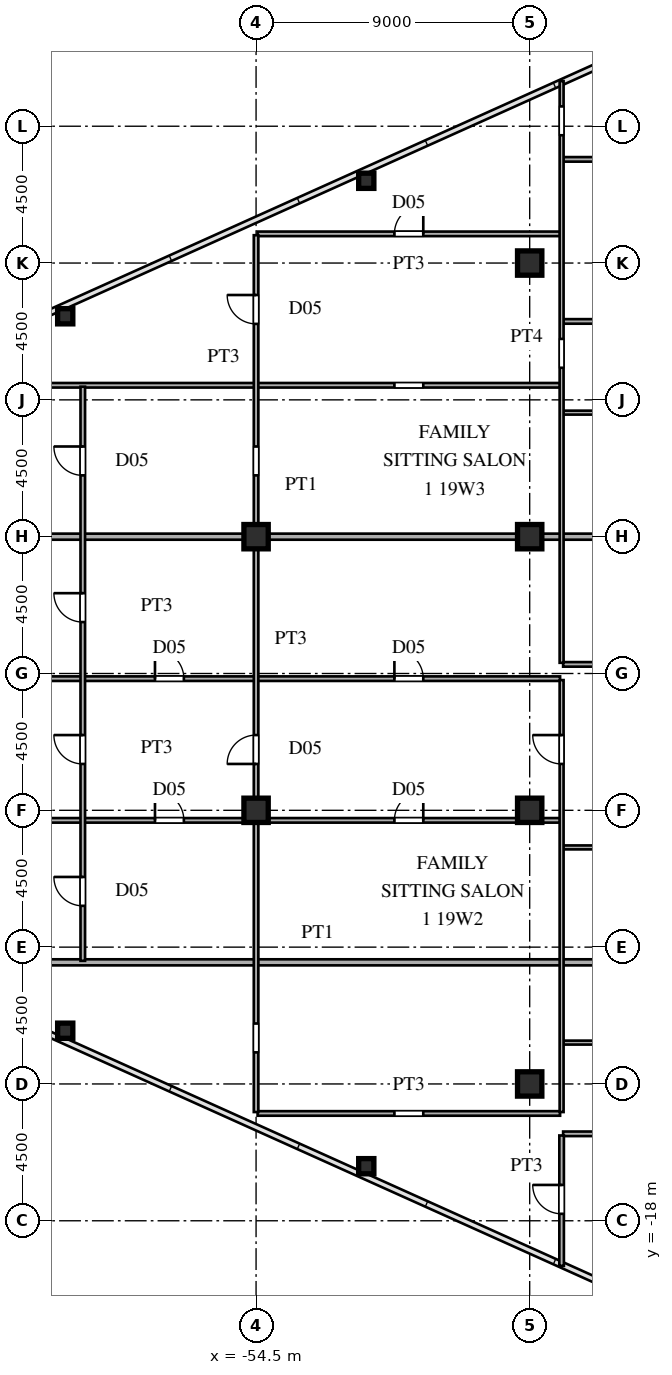
"""IFC4 building model, lengths in metres.
Left out: names, types, materials, properties, quantities, classifications, styles, units other than length and angle.
Written with IfcOpenShell. Run it as: python <this file> out.ifc"""

import sys

from ifc_helpers import new_model, si_unit, direction, frame, frame_2d, origin, origin_2d, place, context, subcontext, project, spatial, rectangle, hollow_rectangle, i_section, extrude, source, transform, mapped, element, fill, save


model = new_model("IFC4")
c1 = context("Model", 3, precision=1e-05, world=origin(), true_north=direction((0.0, 1.0)))
c2 = subcontext(c1, "Body", "Model", "MODEL_VIEW")
j1 = project(units=[si_unit("LENGTHUNIT", "METRE"), si_unit("PLANEANGLEUNIT", "RADIAN")], contexts=[c1])
p1 = place(None, origin())
s1 = spatial("IfcSite", under=j1, at=p1, CompositionType="ELEMENT")
p2 = place(p1, origin())
s2 = spatial("IfcBuilding", under=s1, at=p2, CompositionType="ELEMENT")
p3 = place(p2, frame((0.0, 0.0, 72.9)))
s3 = spatial("IfcBuildingStorey", under=s2, at=p3, CompositionType="ELEMENT", Elevation=72.9)
m1 = source(origin(), c2, "Body", "SweptSolid", [
    extrude(i_section(OverallWidth=0.8, OverallDepth=0.8, WebThickness=0.032, FlangeThickness=0.05, at=origin_2d()), origin(), (0.0, 0.0, 1.0), 3.6),
])
for number, where, z_axis, x_axis in (
    (1, (-45.5, -13.5, 0.0), (0.0, 0.0, 1.0), (1.0, 0.0, 0.0)),
    (2, (-45.5, -4.5, 0.0), (0.0, 0.0, 1.0), (1.0, 0.0, 0.0)),
    (3, (-45.5, 4.5, 0.0), (0.0, 0.0, 1.0), (1.0, 0.0, 0.0)),
    (4, (-45.5, 13.5, 0.0), (0.0, 0.0, 1.0), (1.0, 0.0, 0.0)),
    (5, (-54.5, -4.5, 0.0), (0.0, 0.0, 1.0), (1.0, 0.0, 0.0)),
    (6, (-54.5, 4.5, 0.0), (0.0, 0.0, 1.0), (1.0, 0.0, 0.0)),
):
    element("IfcColumn", number, at=place(p3, frame(where, z_axis=z_axis, x_axis=x_axis)), inside=s3, PredefinedType="COLUMN", context=c2, shape_type="MappedRepresentation", body=[
        mapped(m1, transform((0.0, 0.0, 0.0), scale=1.0)),
    ])
m2 = source(origin(), c2, "Body", "SweptSolid", [
    extrude(hollow_rectangle(XDim=0.5, YDim=0.5, WallThickness=0.02, at=origin_2d()), origin(), (0.0, 0.0, 1.0), 3.6),
])
for number, where, z_axis, x_axis in (
    (7, (-50.875, -16.205, 0.0), (0.0, 0.0, 1.0), (1.0, 0.0, 0.0)),
    (8, (-60.778, -11.749, 0.0), (0.0, 0.0, 1.0), (1.0, 0.0, 0.0)),
    (9, (-50.875, 16.205, 0.0), (0.0, 0.0, 1.0), (1.0, 0.0, 0.0)),
    (10, (-60.778, 11.749, 0.0), (0.0, 0.0, 1.0), (1.0, 0.0, 0.0)),
):
    element("IfcColumn", number, at=place(p3, frame(where, z_axis=z_axis, x_axis=x_axis)), inside=s3, PredefinedType="COLUMN", context=c2, shape_type="MappedRepresentation", body=[
        mapped(m2, transform((0.0, 0.0, 0.0), scale=1.0)),
    ])
p4 = place(p3, frame((-44.4, -15.14, 0.0), z_axis=(0.0, 0.0, 1.0), x_axis=(1.0, 0.0, 0.0)))
e11 = element("IfcWall", 11, at=p4, inside=s3, PredefinedType="PARTITIONING", context=c2, shape_type="SweptSolid", body=[
    extrude(rectangle(XDim=6.05, YDim=0.15, at=frame_2d((3.025, 0.0))), origin(), (0.0, 0.0, 1.0), 3.38),
])
p5 = place(p4, frame((2.55, 0.0, 0.0)))
e12 = element("IfcOpeningElement", 12, at=p5, cuts=e11, PredefinedType="OPENING", context=c2, shape_type="SweptSolid", body=[
    extrude(rectangle(XDim=0.95, YDim=2.15, at=frame_2d((0.475, 1.075))), frame((0.0, 0.085, 0.0), z_axis=(0.0, -1.0, 0.0), x_axis=(1.0, 0.0, 0.0)), (0.0, 0.0, 1.0), 0.17),
])
p6 = place(p3, frame((-54.45, -14.47, 0.0), z_axis=(0.0, 0.0, 1.0), x_axis=(1.0, 0.0, 0.0)))
e13 = element("IfcWall", 13, at=p6, inside=s3, PredefinedType="PARTITIONING", context=c2, shape_type="SweptSolid", body=[
    extrude(rectangle(XDim=9.95, YDim=0.15, at=frame_2d((4.975, 0.0))), origin(), (0.0, 0.0, 1.0), 3.38),
])
p7 = place(p6, frame((4.5, 0.0, 0.0)))
e14 = element("IfcOpeningElement", 14, at=p7, cuts=e13, PredefinedType="OPENING", context=c2, shape_type="SweptSolid", body=[
    extrude(rectangle(XDim=0.95, YDim=2.15, at=frame_2d((0.475, 1.075))), frame((0.0, 0.085, 0.0), z_axis=(0.0, -1.0, 0.0), x_axis=(1.0, 0.0, 0.0)), (0.0, 0.0, 1.0), 0.17),
])
p8 = place(p3, frame((-44.4, -12.14, 0.0), z_axis=(0.0, 0.0, 1.0), x_axis=(1.0, 0.0, 0.0)))
e15 = element("IfcWall", 15, at=p8, inside=s3, PredefinedType="PARTITIONING", context=c2, shape_type="SweptSolid", body=[
    extrude(rectangle(XDim=6.05, YDim=0.13, at=frame_2d((3.025, 0.0))), origin(), (0.0, 0.0, 1.0), 3.38),
])
p9 = place(p8, frame((2.585, 0.0, 0.0)))
e16 = element("IfcOpeningElement", 16, at=p9, cuts=e15, PredefinedType="OPENING", context=c2, shape_type="SweptSolid", body=[
    extrude(rectangle(XDim=0.88, YDim=2.1, at=frame_2d((0.44, 1.05))), frame((0.0, 0.075, 0.0), z_axis=(0.0, -1.0, 0.0), x_axis=(1.0, 0.0, 0.0)), (0.0, 0.0, 1.0), 0.15),
])
p10 = place(p3, frame((-66.568, -9.5, 0.0), z_axis=(0.0, 0.0, 1.0), x_axis=(1.0, 0.0, 0.0)))
e17 = element("IfcWall", 17, at=p10, inside=s3, PredefinedType="PARTITIONING", context=c2, shape_type="SweptSolid", body=[
    extrude(rectangle(XDim=28.188, YDim=0.2, at=frame_2d((14.094, 0.0))), origin(), (0.0, 0.0, 1.0), 3.38),
])
p11 = place(p3, frame((-44.4, -5.72, 0.0), z_axis=(0.0, 0.0, 1.0), x_axis=(1.0, 0.0, 0.0)))
e18 = element("IfcWall", 18, at=p11, inside=s3, PredefinedType="PARTITIONING", context=c2, shape_type="SweptSolid", body=[
    extrude(rectangle(XDim=6.05, YDim=0.13, at=frame_2d((3.025, 0.0))), origin(), (0.0, 0.0, 1.0), 3.38),
])
p12 = place(p11, frame((2.585, 0.0, 0.0)))
e19 = element("IfcOpeningElement", 19, at=p12, cuts=e18, PredefinedType="OPENING", context=c2, shape_type="SweptSolid", body=[
    extrude(rectangle(XDim=0.88, YDim=2.1, at=frame_2d((0.44, 1.05))), frame((0.0, 0.075, 0.0), z_axis=(0.0, -1.0, 0.0), x_axis=(1.0, 0.0, 0.0)), (0.0, 0.0, 1.0), 0.15),
])
p13 = place(p3, frame((-71.035, -4.83, 0.0), z_axis=(0.0, 0.0, 1.0), x_axis=(1.0, 0.0, 0.0)))
e20 = element("IfcWall", 20, at=p13, inside=s3, PredefinedType="PARTITIONING", context=c2, shape_type="SweptSolid", body=[
    extrude(rectangle(XDim=26.535, YDim=0.15, at=frame_2d((13.268, 0.0))), origin(), (0.0, 0.0, 1.0), 3.38),
])
p14 = place(p13, frame((21.085, 0.0, 0.0)))
e21 = element("IfcOpeningElement", 21, at=p14, cuts=e20, PredefinedType="OPENING", context=c2, shape_type="SweptSolid", body=[
    extrude(rectangle(XDim=0.95, YDim=2.15, at=frame_2d((0.475, 1.075))), frame((0.0, 0.085, 0.0), z_axis=(0.0, -1.0, 0.0), x_axis=(1.0, 0.0, 0.0)), (0.0, 0.0, 1.0), 0.17),
])
p15 = place(p13, frame((13.21, 0.0, 0.0)))
e22 = element("IfcOpeningElement", 22, at=p15, cuts=e20, PredefinedType="OPENING", context=c2, shape_type="SweptSolid", body=[
    extrude(rectangle(XDim=0.95, YDim=2.15, at=frame_2d((0.475, 1.075))), frame((0.0, 0.085, 0.0), z_axis=(0.0, -1.0, 0.0), x_axis=(1.0, 0.0, 0.0)), (0.0, 0.0, 1.0), 0.17),
])
p16 = place(p3, frame((-71.035, -0.17, 0.0), z_axis=(0.0, 0.0, 1.0), x_axis=(1.0, 0.0, 0.0)))
e23 = element("IfcWall", 23, at=p16, inside=s3, PredefinedType="PARTITIONING", context=c2, shape_type="SweptSolid", body=[
    extrude(rectangle(XDim=26.535, YDim=0.15, at=frame_2d((13.268, 0.0))), origin(), (0.0, 0.0, 1.0), 3.38),
])
p17 = place(p16, frame((21.085, 0.0, 0.0)))
e24 = element("IfcOpeningElement", 24, at=p17, cuts=e23, PredefinedType="OPENING", context=c2, shape_type="SweptSolid", body=[
    extrude(rectangle(XDim=0.95, YDim=2.15, at=frame_2d((0.475, 1.075))), frame((0.0, 0.085, 0.0), z_axis=(0.0, -1.0, 0.0), x_axis=(1.0, 0.0, 0.0)), (0.0, 0.0, 1.0), 0.17),
])
p18 = place(p16, frame((13.21, 0.0, 0.0)))
e25 = element("IfcOpeningElement", 25, at=p18, cuts=e23, PredefinedType="OPENING", context=c2, shape_type="SweptSolid", body=[
    extrude(rectangle(XDim=0.95, YDim=2.15, at=frame_2d((0.475, 1.075))), frame((0.0, 0.085, 0.0), z_axis=(0.0, -1.0, 0.0), x_axis=(1.0, 0.0, 0.0)), (0.0, 0.0, 1.0), 0.17),
])
p19 = place(p3, frame((-44.4, 0.3, 0.0), z_axis=(0.0, 0.0, 1.0), x_axis=(1.0, 0.0, 0.0)))
e26 = element("IfcWall", 26, at=p19, inside=s3, PredefinedType="PARTITIONING", context=c2, shape_type="SweptSolid", body=[
    extrude(rectangle(XDim=6.05, YDim=0.15, at=frame_2d((3.025, 0.0))), origin(), (0.0, 0.0, 1.0), 3.38),
])
p20 = place(p19, frame((2.55, 0.0, 0.0)))
e27 = element("IfcOpeningElement", 27, at=p20, cuts=e26, PredefinedType="OPENING", context=c2, shape_type="SweptSolid", body=[
    extrude(rectangle(XDim=0.95, YDim=2.15, at=frame_2d((0.475, 1.075))), frame((0.0, 0.085, 0.0), z_axis=(0.0, -1.0, 0.0), x_axis=(1.0, 0.0, 0.0)), (0.0, 0.0, 1.0), 0.17),
])
p21 = place(p3, frame((-71.005, 4.5, 0.0), z_axis=(0.0, 0.0, 1.0), x_axis=(1.0, 0.0, 0.0)))
e28 = element("IfcWall", 28, at=p21, inside=s3, PredefinedType="PARTITIONING", context=c2, shape_type="SweptSolid", body=[
    extrude(rectangle(XDim=16.485, YDim=0.2, at=frame_2d((8.242, 0.0))), origin(), (0.0, 0.0, 1.0), 3.38),
])
p22 = place(p3, frame((-54.52, 4.5, 0.0), z_axis=(0.0, 0.0, 1.0), x_axis=(1.0, 0.0, 0.0)))
e29 = element("IfcWall", 29, at=p22, inside=s3, PredefinedType="PARTITIONING", context=c2, shape_type="SweptSolid", body=[
    extrude(rectangle(XDim=16.14, YDim=0.2, at=frame_2d((8.07, 0.0))), origin(), (0.0, 0.0, 1.0), 2.68),
])
p23 = place(p3, frame((-44.4, 8.58, 0.0), z_axis=(0.0, 0.0, 1.0), x_axis=(1.0, 0.0, 0.0)))
e30 = element("IfcWall", 30, at=p23, inside=s3, PredefinedType="PARTITIONING", context=c2, shape_type="SweptSolid", body=[
    extrude(rectangle(XDim=6.05, YDim=0.13, at=frame_2d((3.025, 0.0))), origin(), (0.0, 0.0, 1.0), 3.38),
])
p24 = place(p23, frame((2.585, 0.0, 0.0)))
e31 = element("IfcOpeningElement", 31, at=p24, cuts=e30, PredefinedType="OPENING", context=c2, shape_type="SweptSolid", body=[
    extrude(rectangle(XDim=0.88, YDim=2.1, at=frame_2d((0.44, 1.05))), frame((0.0, 0.075, 0.0), z_axis=(0.0, -1.0, 0.0), x_axis=(1.0, 0.0, 0.0)), (0.0, 0.0, 1.0), 0.15),
])
p25 = place(p3, frame((-66.629, 9.48, 0.0), z_axis=(0.0, 0.0, 1.0), x_axis=(1.0, 0.0, 0.0)))
e32 = element("IfcWall", 32, at=p25, inside=s3, PredefinedType="PARTITIONING", context=c2, shape_type="SweptSolid", body=[
    extrude(rectangle(XDim=22.129, YDim=0.15, at=frame_2d((11.064, 0.0))), origin(), (0.0, 0.0, 1.0), 3.38),
])
p26 = place(p25, frame((16.679, 0.0, 0.0)))
e33 = element("IfcOpeningElement", 33, at=p26, cuts=e32, PredefinedType="OPENING", context=c2, shape_type="SweptSolid", body=[
    extrude(rectangle(XDim=0.95, YDim=2.15, at=frame_2d((0.475, 1.075))), frame((0.0, 0.085, 0.0), z_axis=(0.0, -1.0, 0.0), x_axis=(1.0, 0.0, 0.0)), (0.0, 0.0, 1.0), 0.17),
])
p27 = place(p3, frame((-44.4, 11.58, 0.0), z_axis=(0.0, 0.0, 1.0), x_axis=(1.0, 0.0, 0.0)))
e34 = element("IfcWall", 34, at=p27, inside=s3, PredefinedType="PARTITIONING", context=c2, shape_type="SweptSolid", body=[
    extrude(rectangle(XDim=6.05, YDim=0.15, at=frame_2d((3.025, 0.0))), origin(), (0.0, 0.0, 1.0), 3.38),
])
p28 = place(p27, frame((2.55, 0.0, 0.0)))
e35 = element("IfcOpeningElement", 35, at=p28, cuts=e34, PredefinedType="OPENING", context=c2, shape_type="SweptSolid", body=[
    extrude(rectangle(XDim=0.95, YDim=2.15, at=frame_2d((0.475, 1.075))), frame((0.0, 0.085, 0.0), z_axis=(0.0, -1.0, 0.0), x_axis=(1.0, 0.0, 0.0)), (0.0, 0.0, 1.0), 0.17),
])
p29 = place(p3, frame((-54.45, 14.46, 0.0), z_axis=(0.0, 0.0, 1.0), x_axis=(1.0, 0.0, 0.0)))
e36 = element("IfcWall", 36, at=p29, inside=s3, PredefinedType="PARTITIONING", context=c2, shape_type="SweptSolid", body=[
    extrude(rectangle(XDim=9.95, YDim=0.15, at=frame_2d((4.975, 0.0))), origin(), (0.0, 0.0, 1.0), 3.38),
])
p30 = place(p29, frame((4.5, 0.0, 0.0)))
e37 = element("IfcOpeningElement", 37, at=p30, cuts=e36, PredefinedType="OPENING", context=c2, shape_type="SweptSolid", body=[
    extrude(rectangle(XDim=0.95, YDim=2.15, at=frame_2d((0.475, 1.075))), frame((0.0, 0.085, 0.0), z_axis=(0.0, -1.0, 0.0), x_axis=(1.0, 0.0, 0.0)), (0.0, 0.0, 1.0), 0.17),
])
p31 = place(p3, frame((-44.4, 16.91, 0.0), z_axis=(0.0, 0.0, 1.0), x_axis=(1.0, 0.0, 0.0)))
e38 = element("IfcWall", 38, at=p31, inside=s3, PredefinedType="PARTITIONING", context=c2, shape_type="SweptSolid", body=[
    extrude(rectangle(XDim=6.1, YDim=0.15, at=frame_2d((3.05, 0.0))), origin(), (0.0, 0.0, 1.0), 3.38),
])
p32 = place(p3, frame((-60.2, -9.45, 0.0), z_axis=(0.0, 0.0, 1.0), x_axis=(0.0, 1.0, 0.0)))
e39 = element("IfcWall", 39, at=p32, inside=s3, PredefinedType="PARTITIONING", context=c2, shape_type="SweptSolid", body=[
    extrude(rectangle(XDim=18.883, YDim=0.15, at=frame_2d((9.441, 0.0))), origin(), (0.0, 0.0, 1.0), 3.38),
])
p33 = place(p32, frame((1.808, 0.0, 0.0)))
e40 = element("IfcOpeningElement", 40, at=p33, cuts=e39, PredefinedType="OPENING", context=c2, shape_type="SweptSolid", body=[
    extrude(rectangle(XDim=0.95, YDim=2.15, at=frame_2d((0.475, 1.075))), frame((0.0, 0.085, 0.0), z_axis=(0.0, -1.0, 0.0), x_axis=(1.0, 0.0, 0.0)), (0.0, 0.0, 1.0), 0.17),
])
p34 = place(p32, frame((6.475, 0.0, 0.0)))
e41 = element("IfcOpeningElement", 41, at=p34, cuts=e39, PredefinedType="OPENING", context=c2, shape_type="SweptSolid", body=[
    extrude(rectangle(XDim=0.95, YDim=2.15, at=frame_2d((0.475, 1.075))), frame((0.0, 0.085, 0.0), z_axis=(0.0, -1.0, 0.0), x_axis=(1.0, 0.0, 0.0)), (0.0, 0.0, 1.0), 0.17),
])
p35 = place(p32, frame((11.142, 0.0, 0.0)))
e42 = element("IfcOpeningElement", 42, at=p35, cuts=e39, PredefinedType="OPENING", context=c2, shape_type="SweptSolid", body=[
    extrude(rectangle(XDim=0.95, YDim=2.15, at=frame_2d((0.475, 1.075))), frame((0.0, 0.085, 0.0), z_axis=(0.0, -1.0, 0.0), x_axis=(1.0, 0.0, 0.0)), (0.0, 0.0, 1.0), 0.17),
])
p36 = place(p32, frame((15.966, 0.0, 0.0)))
e43 = element("IfcOpeningElement", 43, at=p36, cuts=e39, PredefinedType="OPENING", context=c2, shape_type="SweptSolid", body=[
    extrude(rectangle(XDim=0.95, YDim=2.15, at=frame_2d((0.475, 1.075))), frame((0.0, 0.085, 0.0), z_axis=(0.0, -1.0, 0.0), x_axis=(1.0, 0.0, 0.0)), (0.0, 0.0, 1.0), 0.17),
])
p37 = place(p3, frame((-54.5, -14.424, 0.0), z_axis=(0.0, 0.0, 1.0), x_axis=(0.0, 1.0, 0.0)))
e44 = element("IfcWall", 44, at=p37, inside=s3, PredefinedType="PARTITIONING", context=c2, shape_type="SweptSolid", body=[
    extrude(rectangle(XDim=28.839, YDim=0.15, at=frame_2d((14.419, 0.0))), origin(), (0.0, 0.0, 1.0), 2.68),
])
p38 = place(p37, frame((1.962, 0.0, 0.0)))
e45 = element("IfcOpeningElement", 45, at=p38, cuts=e44, PredefinedType="OPENING", context=c2, shape_type="SweptSolid", body=[
    extrude(rectangle(XDim=0.95, YDim=2.15, at=frame_2d((0.475, 1.075))), frame((0.0, 0.085, 0.0), z_axis=(0.0, -1.0, 0.0), x_axis=(1.0, 0.0, 0.0)), (0.0, 0.0, 1.0), 0.17),
])
p39 = place(p37, frame((11.449, 0.0, 0.0)))
e46 = element("IfcOpeningElement", 46, at=p39, cuts=e44, PredefinedType="OPENING", context=c2, shape_type="SweptSolid", body=[
    extrude(rectangle(XDim=0.95, YDim=2.15, at=frame_2d((0.475, 1.075))), frame((0.0, 0.085, 0.0), z_axis=(0.0, -1.0, 0.0), x_axis=(1.0, 0.0, 0.0)), (0.0, 0.0, 1.0), 0.17),
])
p40 = place(p37, frame((25.923, 0.0, 0.0)))
e47 = element("IfcOpeningElement", 47, at=p40, cuts=e44, PredefinedType="OPENING", context=c2, shape_type="SweptSolid", body=[
    extrude(rectangle(XDim=0.95, YDim=2.15, at=frame_2d((0.475, 1.075))), frame((0.0, 0.085, 0.0), z_axis=(0.0, -1.0, 0.0), x_axis=(1.0, 0.0, 0.0)), (0.0, 0.0, 1.0), 0.17),
])
p41 = place(p37, frame((20.94, 0.0, 0.0)))
e48 = element("IfcOpeningElement", 48, at=p41, cuts=e44, PredefinedType="OPENING", context=c2, shape_type="SweptSolid", body=[
    extrude(rectangle(XDim=0.95, YDim=2.15, at=frame_2d((0.475, 1.075))), frame((0.0, 0.085, 0.0), z_axis=(0.0, -1.0, 0.0), x_axis=(1.0, 0.0, 0.0)), (0.0, 0.0, 1.0), 0.17),
])
p42 = place(p3, frame((-44.45, -19.483, 0.0), z_axis=(0.0, 0.0, 1.0), x_axis=(0.0, 1.0, 0.0)))
e49 = element("IfcWall", 49, at=p42, inside=s3, PredefinedType="PARTITIONING", context=c2, shape_type="SweptSolid", body=[
    extrude(rectangle(XDim=4.288, YDim=0.15, at=frame_2d((2.144, 0.0))), origin(), (0.0, 0.0, 1.0), 3.38),
])
p43 = place(p42, frame((1.712, 0.0, 0.0)))
e50 = element("IfcOpeningElement", 50, at=p43, cuts=e49, PredefinedType="OPENING", context=c2, shape_type="SweptSolid", body=[
    extrude(rectangle(XDim=0.95, YDim=2.15, at=frame_2d((0.475, 1.075))), frame((0.0, 0.085, 0.0), z_axis=(0.0, -1.0, 0.0), x_axis=(1.0, 0.0, 0.0)), (0.0, 0.0, 1.0), 0.17),
])
p44 = place(p3, frame((-44.45, -14.424, 0.0), z_axis=(0.0, 0.0, 1.0), x_axis=(0.0, 1.0, 0.0)))
e51 = element("IfcWall", 51, at=p44, inside=s3, PredefinedType="PARTITIONING", context=c2, shape_type="SweptSolid", body=[
    extrude(rectangle(XDim=14.207, YDim=0.13, at=frame_2d((7.104, 0.0))), origin(), (0.0, 0.0, 1.0), 3.38),
])
p45 = place(p44, frame((11.449, 0.0, 0.0)))
e52 = element("IfcOpeningElement", 52, at=p45, cuts=e51, PredefinedType="OPENING", context=c2, shape_type="SweptSolid", body=[
    extrude(rectangle(XDim=0.95, YDim=2.15, at=frame_2d((0.475, 1.075))), frame((0.0, 0.075, 0.0), z_axis=(0.0, -1.0, 0.0), x_axis=(1.0, 0.0, 0.0)), (0.0, 0.0, 1.0), 0.15),
])
p46 = place(p3, frame((-44.45, 0.352, 0.0), z_axis=(0.0, 0.0, 1.0), x_axis=(0.0, 1.0, 0.0)))
e53 = element("IfcWall", 53, at=p46, inside=s3, PredefinedType="PARTITIONING", context=c2, shape_type="SweptSolid", body=[
    extrude(rectangle(XDim=19.131, YDim=0.13, at=frame_2d((9.565, 0.0))), origin(), (0.0, 0.0, 1.0), 3.38),
])
p47 = place(p46, frame((9.703, 0.0, 0.0)))
e54 = element("IfcOpeningElement", 54, at=p47, cuts=e53, PredefinedType="OPENING", context=c2, shape_type="SweptSolid", body=[
    extrude(rectangle(XDim=0.95, YDim=2.15, at=frame_2d((0.475, 1.075))), frame((0.0, 0.075, 0.0), z_axis=(0.0, -1.0, 0.0), x_axis=(1.0, 0.0, 0.0)), (0.0, 0.0, 1.0), 0.15),
])
p48 = place(p46, frame((17.351, 0.0, 0.0)))
e55 = element("IfcOpeningElement", 55, at=p48, cuts=e53, PredefinedType="OPENING", context=c2, shape_type="SweptSolid", body=[
    extrude(rectangle(XDim=0.95, YDim=2.15, at=frame_2d((0.475, 1.075))), frame((0.0, 0.075, 0.0), z_axis=(0.0, -1.0, 0.0), x_axis=(1.0, 0.0, 0.0)), (0.0, 0.0, 1.0), 0.15),
])
m3 = source(origin(), c2, "Body", "SweptSolid", [
    extrude(rectangle(XDim=0.95, YDim=2.15, at=frame_2d((0.475, 1.075))), frame((0.0, 0.025, 0.0), z_axis=(0.0, -1.0, 0.0), x_axis=(1.0, 0.0, 0.0)), (0.0, 0.0, 1.0), 0.05),
])
p49 = place(p14, origin())
e56 = element("IfcDoor", 56, at=p49, inside=s3, OperationType="SINGLE_SWING_RIGHT", PredefinedType="DOOR", context=c2, shape_type="MappedRepresentation", body=[
    mapped(m3, transform((0.0, 0.0, 0.0), scale=1.0)),
])
fill(e21, e56)
p50 = place(p15, origin())
e57 = element("IfcDoor", 57, at=p50, inside=s3, OperationType="SINGLE_SWING_LEFT", PredefinedType="DOOR", context=c2, shape_type="MappedRepresentation", body=[
    mapped(m3, transform((0.0, 0.0, 0.0), scale=1.0)),
])
fill(e22, e57)
p51 = place(p17, origin())
e58 = element("IfcDoor", 58, at=p51, inside=s3, OperationType="SINGLE_SWING_LEFT", PredefinedType="DOOR", context=c2, shape_type="MappedRepresentation", body=[
    mapped(m3, transform((0.0, 0.0, 0.0), scale=1.0)),
])
fill(e24, e58)
p52 = place(p18, origin())
e59 = element("IfcDoor", 59, at=p52, inside=s3, OperationType="SINGLE_SWING_LEFT", PredefinedType="DOOR", context=c2, shape_type="MappedRepresentation", body=[
    mapped(m3, transform((0.0, 0.0, 0.0), scale=1.0)),
])
fill(e25, e59)
p53 = place(p30, origin())
e60 = element("IfcDoor", 60, at=p53, inside=s3, OperationType="SINGLE_SWING_RIGHT", PredefinedType="DOOR", context=c2, shape_type="MappedRepresentation", body=[
    mapped(m3, transform((0.0, 0.0, 0.0), scale=1.0)),
])
fill(e37, e60)
p54 = place(p33, origin())
e61 = element("IfcDoor", 61, at=p54, inside=s3, OperationType="SINGLE_SWING_RIGHT", PredefinedType="DOOR", context=c2, shape_type="MappedRepresentation", body=[
    mapped(m3, transform((0.0, 0.0, 0.0), scale=1.0)),
])
fill(e40, e61)
p55 = place(p34, origin())
e62 = element("IfcDoor", 62, at=p55, inside=s3, OperationType="SINGLE_SWING_RIGHT", PredefinedType="DOOR", context=c2, shape_type="MappedRepresentation", body=[
    mapped(m3, transform((0.0, 0.0, 0.0), scale=1.0)),
])
fill(e41, e62)
p56 = place(p35, origin())
e63 = element("IfcDoor", 63, at=p56, inside=s3, OperationType="SINGLE_SWING_RIGHT", PredefinedType="DOOR", context=c2, shape_type="MappedRepresentation", body=[
    mapped(m3, transform((0.0, 0.0, 0.0), scale=1.0)),
])
fill(e42, e63)
p57 = place(p36, origin())
e64 = element("IfcDoor", 64, at=p57, inside=s3, OperationType="SINGLE_SWING_RIGHT", PredefinedType="DOOR", context=c2, shape_type="MappedRepresentation", body=[
    mapped(m3, transform((0.0, 0.0, 0.0), scale=1.0)),
])
fill(e43, e64)
p58 = place(p39, origin())
e65 = element("IfcDoor", 65, at=p58, inside=s3, OperationType="SINGLE_SWING_LEFT", PredefinedType="DOOR", context=c2, shape_type="MappedRepresentation", body=[
    mapped(m3, transform((0.0, 0.0, 0.0), scale=1.0)),
])
fill(e46, e65)
p59 = place(p40, origin())
e66 = element("IfcDoor", 66, at=p59, inside=s3, OperationType="SINGLE_SWING_RIGHT", PredefinedType="DOOR", context=c2, shape_type="MappedRepresentation", body=[
    mapped(m3, transform((0.0, 0.0, 0.0), scale=1.0)),
])
fill(e47, e66)
p60 = place(p43, origin())
e67 = element("IfcDoor", 67, at=p60, inside=s3, OperationType="SINGLE_SWING_RIGHT", PredefinedType="DOOR", context=c2, shape_type="MappedRepresentation", body=[
    mapped(m3, transform((0.0, 0.0, 0.0), scale=1.0)),
])
fill(e50, e67)
p61 = place(p45, origin())
e68 = element("IfcDoor", 68, at=p61, inside=s3, OperationType="SINGLE_SWING_RIGHT", PredefinedType="DOOR", context=c2, shape_type="MappedRepresentation", body=[
    mapped(m3, transform((0.0, 0.0, 0.0), scale=1.0)),
])
fill(e52, e68)
save(model, sys.argv[1])
